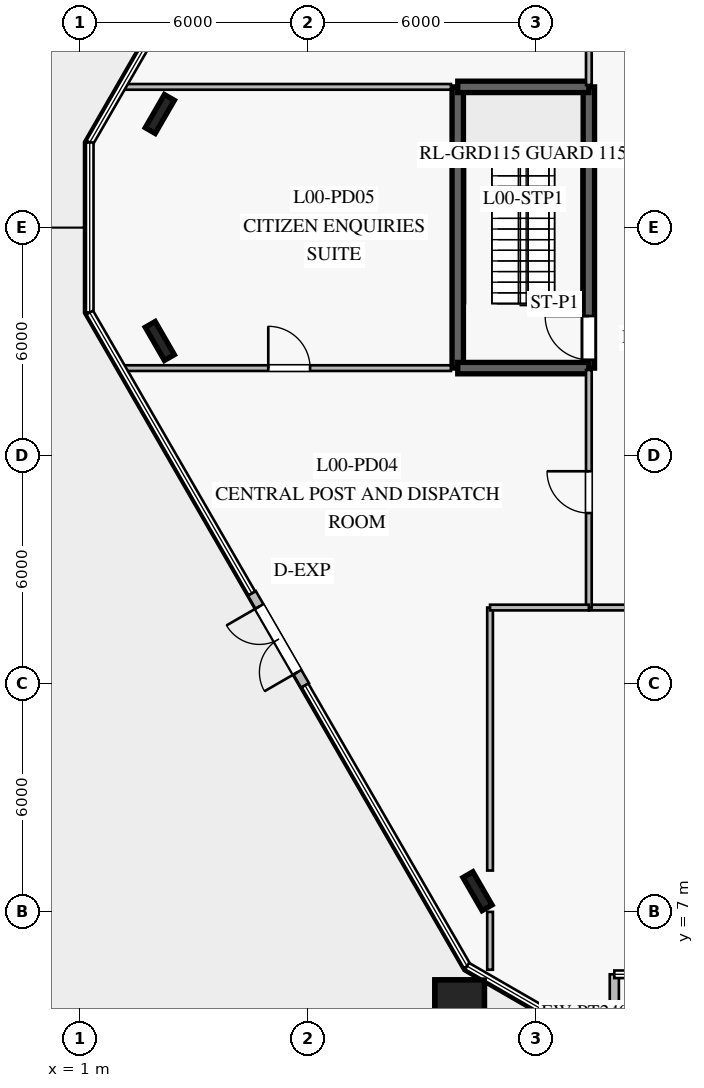
"""IFC4 building model, lengths in metres.
Left out: names, types, materials, properties, quantities, classifications, styles, units other than length and angle.
Written with IfcOpenShell. Run it as: python <this file> out.ifc"""

import sys

from ifc_helpers import new_model, si_unit, direction, frame, frame_2d, origin, origin_2d, place, context, subcontext, project, spatial, rectangle, i_section, extrude, element, fill, save


model = new_model("IFC4")
c1 = context("Model", 3, precision=1e-05, world=origin(), true_north=direction((0.0, 1.0)))
c2 = subcontext(c1, "Body", "Model", "MODEL_VIEW")
j1 = project(units=[si_unit("LENGTHUNIT", "METRE"), si_unit("PLANEANGLEUNIT", "RADIAN")], contexts=[c1])
p1 = place(None, origin())
s1 = spatial("IfcSite", under=j1, at=p1, CompositionType="ELEMENT")
p2 = place(p1, origin())
s2 = spatial("IfcBuilding", under=s1, at=p2, CompositionType="ELEMENT")
p3 = place(p2, origin())
s3 = spatial("IfcBuildingStorey", under=s2, at=p3, CompositionType="ELEMENT", Elevation=0.0)
p4 = place(p3, frame((14.4, 21.3, 0.0), z_axis=(0.0, 0.0, 1.0), x_axis=(0.0, 1.0, 0.0)))
e1 = element("IfcWall", 1, at=p4, inside=s3, PredefinedType="SOLIDWALL", context=c2, shape_type="SweptSolid", body=[
    extrude(rectangle(XDim=7.4, YDim=0.3, at=frame_2d((3.7, 0.0))), origin(), (0.0, 0.0, 1.0), 4.94),
])
p5 = place(p4, frame((0.22, 0.0, 0.0)))
e2 = element("IfcOpeningElement", 2, at=p5, cuts=e1, PredefinedType="OPENING", context=c2, shape_type="SweptSolid", body=[
    extrude(rectangle(XDim=1.15, YDim=2.2, at=frame_2d((0.575, 1.1))), frame((0.0, 0.16, 0.0), z_axis=(0.0, -1.0, 0.0), x_axis=(1.0, 0.0, 0.0)), (0.0, 0.0, 1.0), 0.32),
])
p6 = place(p3, frame((10.95, 21.3, 0.0), z_axis=(0.0, 0.0, 1.0), x_axis=(0.0, 1.0, 0.0)))
e3 = element("IfcWall", 3, at=p6, inside=s3, PredefinedType="SOLIDWALL", context=c2, shape_type="SweptSolid", body=[
    extrude(rectangle(XDim=7.4, YDim=0.3, at=frame_2d((3.7, 0.0))), origin(), (0.0, 0.0, 1.0), 4.94),
])
for number, where, z_axis, x_axis in (
    (4, (10.95, 21.3, 0.0), (0.0, 0.0, 1.0), (1.0, 0.0, 0.0)),
    (5, (10.95, 28.7, 0.0), (0.0, 0.0, 1.0), (1.0, 0.0, 0.0)),
):
    element("IfcWall", number, at=place(p3, frame(where, z_axis=z_axis, x_axis=x_axis)), inside=s3, PredefinedType="SOLIDWALL", context=c2, shape_type="SweptSolid", body=[
        extrude(rectangle(XDim=3.45, YDim=0.3, at=frame_2d((1.725, 0.0))), origin(), (0.0, 0.0, 1.0), 4.94),
    ])
for number, where, z_axis, x_axis in (
    (6, (3.11, 27.986, 0.0), (0.0, 0.0, 1.0), (0.5, 0.866, 0.0)),
    (7, (3.11, 22.014, 0.0), (0.0, 0.0, 1.0), (-0.5, 0.866, 0.0)),
    (8, (11.469, 7.536, 0.0), (0.0, 0.0, 1.0), (-0.5, 0.866, 0.0)),
):
    element("IfcColumn", number, at=place(p3, frame(where, z_axis=z_axis, x_axis=x_axis)), inside=s3, PredefinedType="COLUMN", context=c2, shape_type="SweptSolid", body=[
        extrude(i_section(OverallWidth=0.302, OverallDepth=1.008, WebThickness=0.021, FlangeThickness=0.04, at=origin_2d()), origin(), (0.0, 0.0, 1.0), 5.2),
    ])
p7 = place(p3, frame((11.0, 4.55, 0.0), z_axis=(0.0, 0.0, 1.0), x_axis=(1.0, 0.0, 0.0)))
e9 = element("IfcColumn", 9, at=p7, inside=s3, PredefinedType="COLUMN", context=c2, shape_type="SweptSolid", body=[
    extrude(rectangle(XDim=1.3, YDim=1.3, at=origin_2d()), origin(), (0.0, 0.0, 1.0), 5.2),
])
p8 = place(p3, frame((5.531, 15.376, 0.0), z_axis=(0.0, 0.0, 1.0), x_axis=(0.49994636267, -0.866056369097, 0.0)))
e10 = element("IfcWall", 10, at=p8, inside=s3, PredefinedType="STANDARD", context=c2, shape_type="SweptSolid", body=[
    extrude(rectangle(XDim=2.8, YDim=0.24, at=frame_2d((1.4, 0.0))), origin(), (0.0, 0.0, 1.0), 4.94),
])
p9 = place(p8, frame((0.4, 0.0, 0.0)))
e11 = element("IfcOpeningElement", 11, at=p9, cuts=e10, PredefinedType="OPENING", context=c2, shape_type="SweptSolid", body=[
    extrude(rectangle(XDim=2.0, YDim=2.4, at=frame_2d((1.0, 1.2))), frame((0.0, 0.13, 0.0), z_axis=(0.0, -1.0, 0.0), x_axis=(1.0, 0.0, 0.0)), (0.0, 0.0, 1.0), 0.26),
])
p10 = place(p3, frame((15.07, 3.327, 0.0), z_axis=(0.0, 0.0, 1.0), x_axis=(0.0, 1.0, 0.0)))
e12 = element("IfcWall", 12, at=p10, inside=s3, PredefinedType="STANDARD", context=c2, shape_type="SweptSolid", body=[
    extrude(rectangle(XDim=2.023, YDim=0.24, at=frame_2d((1.012, 0.0))), origin(), (0.0, 0.0, 1.0), 4.94),
])
p11 = place(p3, frame((14.4, 15.0, 0.0), z_axis=(0.0, 0.0, 1.0), x_axis=(1.0, 0.0, 0.0)))
e13 = element("IfcWall", 13, at=p11, inside=s3, PredefinedType="PARTITIONING", context=c2, shape_type="SweptSolid", body=[
    extrude(rectangle(XDim=21.2, YDim=0.15, at=frame_2d((10.6, 0.0))), origin(), (0.0, 0.0, 1.0), 4.39),
])
p12 = place(p11, frame((9.5, 0.0, 0.0)))
e14 = element("IfcOpeningElement", 14, at=p12, cuts=e13, PredefinedType="OPENING", context=c2, shape_type="SweptSolid", body=[
    extrude(rectangle(XDim=2.2, YDim=2.4, at=frame_2d((1.1, 1.2))), frame((0.0, 0.085, 0.0), z_axis=(0.0, -1.0, 0.0), x_axis=(1.0, 0.0, 0.0)), (0.0, 0.0, 1.0), 0.17),
])
p13 = place(p3, frame((14.4, 15.0, 0.0), z_axis=(0.0, 0.0, 1.0), x_axis=(0.0, 1.0, 0.0)))
e15 = element("IfcWall", 15, at=p13, inside=s3, PredefinedType="PARTITIONING", context=c2, shape_type="SweptSolid", body=[
    extrude(rectangle(XDim=6.25, YDim=0.15, at=frame_2d((3.125, 0.0))), origin(), (0.0, 0.0, 1.0), 4.39),
])
p14 = place(p13, frame((2.486, 0.0, 0.0)))
e16 = element("IfcOpeningElement", 16, at=p14, cuts=e15, PredefinedType="OPENING", context=c2, shape_type="SweptSolid", body=[
    extrude(rectangle(XDim=1.1, YDim=2.2, at=frame_2d((0.55, 1.1))), frame((0.0, 0.085, 0.0), z_axis=(0.0, -1.0, 0.0), x_axis=(1.0, 0.0, 0.0)), (0.0, 0.0, 1.0), 0.17),
])
p15 = place(p3, frame((14.4, 28.75, 0.0), z_axis=(0.0, 0.0, 1.0), x_axis=(0.0, 1.0, 0.0)))
e17 = element("IfcWall", 17, at=p15, inside=s3, PredefinedType="PARTITIONING", context=c2, shape_type="SweptSolid", body=[
    extrude(rectangle(XDim=6.25, YDim=0.15, at=frame_2d((3.125, 0.0))), origin(), (0.0, 0.0, 1.0), 4.94),
])
p16 = place(p15, frame((2.486, 0.0, 0.0)))
e18 = element("IfcOpeningElement", 18, at=p16, cuts=e17, PredefinedType="OPENING", context=c2, shape_type="SweptSolid", body=[
    extrude(rectangle(XDim=1.1, YDim=2.2, at=frame_2d((0.55, 1.1))), frame((0.0, 0.085, 0.0), z_axis=(0.0, -1.0, 0.0), x_axis=(1.0, 0.0, 0.0)), (0.0, 0.0, 1.0), 0.17),
])
p17 = place(p3, frame((11.8, 5.47, 0.0), z_axis=(0.0, 0.0, 1.0), x_axis=(0.0, 1.0, 0.0)))
e19 = element("IfcWall", 19, at=p17, inside=s3, PredefinedType="PARTITIONING", context=c2, shape_type="SweptSolid", body=[
    extrude(rectangle(XDim=1.522, YDim=0.15, at=frame_2d((0.761, 0.0))), origin(), (0.0, 0.0, 1.0), 4.39),
])
p18 = place(p3, frame((11.8, 8.08, 0.0), z_axis=(0.0, 0.0, 1.0), x_axis=(0.0, 1.0, 0.0)))
e20 = element("IfcWall", 20, at=p18, inside=s3, PredefinedType="PARTITIONING", context=c2, shape_type="SweptSolid", body=[
    extrude(rectangle(XDim=6.92, YDim=0.15, at=frame_2d((3.46, 0.0))), origin(), (0.0, 0.0, 1.0), 4.39),
])
p19 = place(p3, frame((11.8, 15.0, 0.0), z_axis=(0.0, 0.0, 1.0), x_axis=(1.0, 0.0, 0.0)))
e21 = element("IfcWall", 21, at=p19, inside=s3, PredefinedType="PARTITIONING", context=c2, shape_type="SweptSolid", body=[
    extrude(rectangle(XDim=2.6, YDim=0.15, at=frame_2d((1.3, 0.0))), origin(), (0.0, 0.0, 1.0), 4.94),
])
p20 = place(p3, frame((2.08, 21.3, 0.0), z_axis=(0.0, 0.0, 1.0), x_axis=(1.0, 0.0, 0.0)))
e22 = element("IfcWall", 22, at=p20, inside=s3, PredefinedType="PARTITIONING", context=c2, shape_type="SweptSolid", body=[
    extrude(rectangle(XDim=8.69, YDim=0.15, at=frame_2d((4.345, 0.0))), origin(), (0.0, 0.0, 1.0), 4.24),
])
p21 = place(p20, frame((3.884, 0.0, 0.0)))
e23 = element("IfcOpeningElement", 23, at=p21, cuts=e22, PredefinedType="OPENING", context=c2, shape_type="SweptSolid", body=[
    extrude(rectangle(XDim=1.1, YDim=2.2, at=frame_2d((0.55, 1.1))), frame((0.0, 0.085, 0.0), z_axis=(0.0, -1.0, 0.0), x_axis=(1.0, 0.0, 0.0)), (0.0, 0.0, 1.0), 0.17),
])
p22 = place(p3, frame((2.08, 28.7, 0.0), z_axis=(0.0, 0.0, 1.0), x_axis=(1.0, 0.0, 0.0)))
e24 = element("IfcWall", 24, at=p22, inside=s3, PredefinedType="PARTITIONING", context=c2, shape_type="SweptSolid", body=[
    extrude(rectangle(XDim=8.69, YDim=0.15, at=frame_2d((4.345, 0.0))), origin(), (0.0, 0.0, 1.0), 4.24),
])
p23 = place(p9, frame((2.0, 0.0, 0.0), z_axis=(0.0, 0.0, 1.0), x_axis=(-1.0, 0.0, 0.0)))
e25 = element("IfcDoor", 25, at=p23, inside=s3, OperationType="DOUBLE_DOOR_SINGLE_SWING", PredefinedType="DOOR", context=c2, shape_type="SweptSolid", body=[
    extrude(rectangle(XDim=2.0, YDim=2.4, at=frame_2d((1.0, 1.2))), frame((0.0, 0.025, 0.0), z_axis=(0.0, -1.0, 0.0), x_axis=(1.0, 0.0, 0.0)), (0.0, 0.0, 1.0), 0.05),
])
fill(e11, e25)
p24 = place(p5, origin())
e26 = element("IfcDoor", 26, at=p24, inside=s3, OperationType="SINGLE_SWING_RIGHT", PredefinedType="DOOR", context=c2, shape_type="SweptSolid", body=[
    extrude(rectangle(XDim=1.15, YDim=2.2, at=frame_2d((0.575, 1.1))), frame((0.0, 0.025, 0.0), z_axis=(0.0, -1.0, 0.0), x_axis=(1.0, 0.0, 0.0)), (0.0, 0.0, 1.0), 0.05),
])
fill(e2, e26)
p25 = place(p14, origin())
e27 = element("IfcDoor", 27, at=p25, inside=s3, OperationType="SINGLE_SWING_RIGHT", PredefinedType="DOOR", context=c2, shape_type="SweptSolid", body=[
    extrude(rectangle(XDim=1.1, YDim=2.2, at=frame_2d((0.55, 1.1))), frame((0.0, 0.025, 0.0), z_axis=(0.0, -1.0, 0.0), x_axis=(1.0, 0.0, 0.0)), (0.0, 0.0, 1.0), 0.05),
])
fill(e16, e27)
p26 = place(p21, origin())
e28 = element("IfcDoor", 28, at=p26, inside=s3, OperationType="SINGLE_SWING_LEFT", PredefinedType="DOOR", context=c2, shape_type="SweptSolid", body=[
    extrude(rectangle(XDim=1.1, YDim=2.2, at=frame_2d((0.55, 1.1))), frame((0.0, 0.025, 0.0), z_axis=(0.0, -1.0, 0.0), x_axis=(1.0, 0.0, 0.0)), (0.0, 0.0, 1.0), 0.05),
])
fill(e23, e28)
save(model, sys.argv[1])
